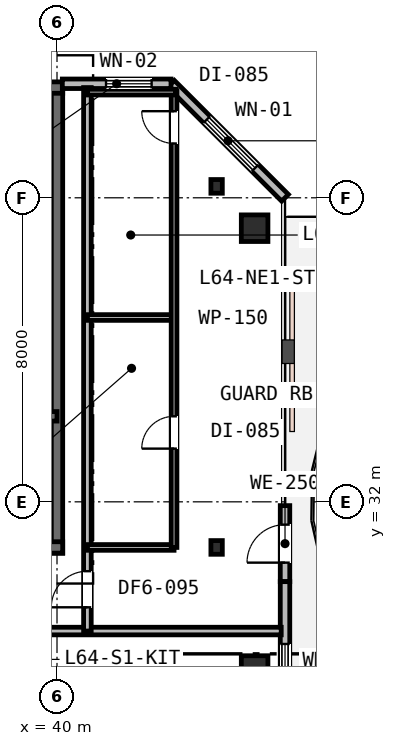
"""IFC4 building model, lengths in metres.
Left out: names, types, materials, properties, quantities, classifications, styles, units other than length and angle.
Written with IfcOpenShell. Run it as: python <this file> out.ifc"""

import sys

from ifc_helpers import new_model, si_unit, direction, frame, frame_2d, origin, origin_2d, place, context, subcontext, project, spatial, rectangle, i_section, extrude, element, fill, save


model = new_model("IFC4")
c1 = context("Model", 3, precision=1e-05, world=origin(), true_north=direction((0.0, 1.0)))
c2 = subcontext(c1, "Body", "Model", "MODEL_VIEW")
j1 = project(units=[si_unit("LENGTHUNIT", "METRE"), si_unit("PLANEANGLEUNIT", "RADIAN")], contexts=[c1])
p1 = place(None, origin())
s1 = spatial("IfcSite", under=j1, at=p1, CompositionType="ELEMENT")
p2 = place(p1, origin())
s2 = spatial("IfcBuilding", under=s1, at=p2, CompositionType="ELEMENT")
p3 = place(p2, frame((0.0, 0.0, 248.8)))
s3 = spatial("IfcBuildingStorey", under=s2, at=p3, CompositionType="ELEMENT", Elevation=248.8)
p4 = place(p3, frame((40.0, 30.65, 0.0), z_axis=(0.0, 0.0, 1.0), x_axis=(0.0, 1.0, 0.0)))
e1 = element("IfcWall", 1, at=p4, inside=s3, PredefinedType="SHEAR", context=c2, shape_type="SweptSolid", body=[
    extrude(rectangle(XDim=12.3, YDim=0.3, at=frame_2d((6.15, 0.0))), origin(), (0.0, 0.0, 1.0), 3.8),
])
p5 = place(p3, frame((15.85, 42.9, 0.0), z_axis=(0.0, 0.0, 1.0), x_axis=(1.0, 0.0, 0.0)))
e2 = element("IfcWall", 2, at=p5, inside=s3, PredefinedType="SHEAR", context=c2, shape_type="SweptSolid", body=[
    extrude(rectangle(XDim=24.3, YDim=0.3, at=frame_2d((12.15, 0.0))), origin(), (0.0, 0.0, 1.0), 3.8),
])
p6 = place(p3, frame((28.95, 30.8, 0.0), z_axis=(0.0, 0.0, 1.0), x_axis=(1.0, 0.0, 0.0)))
e3 = element("IfcWall", 3, at=p6, inside=s3, PredefinedType="SHEAR", context=c2, shape_type="SweptSolid", body=[
    extrude(rectangle(XDim=11.2, YDim=0.3, at=frame_2d((5.6, 0.0))), origin(), (0.0, 0.0, 1.0), 3.8),
])
p7 = place(p6, frame((7.65, 0.0, 0.0)))
e4 = element("IfcOpeningElement", 4, at=p7, cuts=e3, PredefinedType="OPENING", context=c2, shape_type="SweptSolid", body=[
    extrude(rectangle(XDim=1.1, YDim=2.15, at=frame_2d((0.55, 1.075))), frame((0.0, 0.16, 0.0), z_axis=(0.0, -1.0, 0.0), x_axis=(1.0, 0.0, 0.0)), (0.0, 0.0, 1.0), 0.32),
])
p8 = place(p3, frame((33.95, 34.25, 0.0), z_axis=(0.0, 0.0, 1.0), x_axis=(1.0, 0.0, 0.0)))
e5 = element("IfcWall", 5, at=p8, inside=s3, PredefinedType="SHEAR", context=c2, shape_type="SweptSolid", body=[
    extrude(rectangle(XDim=6.05, YDim=0.25, at=frame_2d((3.025, 0.0))), origin(), (0.0, 0.0, 1.0), 3.8),
])
p9 = place(p8, frame((3.7, 0.0, 0.0)))
e6 = element("IfcOpeningElement", 6, at=p9, cuts=e5, PredefinedType="OPENING", context=c2, shape_type="SweptSolid", body=[
    extrude(rectangle(XDim=1.0, YDim=2.15, at=frame_2d((0.5, 1.075))), frame((0.0, 0.135, 0.0), z_axis=(0.0, -1.0, 0.0), x_axis=(1.0, 0.0, 0.0)), (0.0, 0.0, 1.0), 0.27),
])
p10 = place(p8, frame((0.55, 0.0, 0.0)))
e7 = element("IfcOpeningElement", 7, at=p10, cuts=e5, PredefinedType="OPENING", context=c2, shape_type="SweptSolid", body=[
    extrude(rectangle(XDim=1.1, YDim=2.15, at=frame_2d((0.55, 1.075))), frame((0.0, 0.135, 0.0), z_axis=(0.0, -1.0, 0.0), x_axis=(1.0, 0.0, 0.0)), (0.0, 0.0, 1.0), 0.27),
])
for number, where, z_axis, x_axis in (
    (8, (45.2, 27.6, 0.0), (0.0, 0.0, 1.0), (1.0, 0.0, 0.0)),
    (9, (45.2, 39.2, 0.0), (0.0, 0.0, 1.0), (1.0, 0.0, 0.0)),
):
    element("IfcColumn", number, at=place(p3, frame(where, z_axis=z_axis, x_axis=x_axis)), inside=s3, PredefinedType="COLUMN", context=c2, shape_type="SweptSolid", body=[
        extrude(rectangle(XDim=0.7, YDim=0.7, at=origin_2d()), origin(), (0.0, 0.0, 1.0), 3.8),
    ])
for number, where, z_axis, x_axis in (
    (10, (44.2, 30.8, 0.0), (0.0, 0.0, 1.0), (1.0, 0.0, 0.0)),
    (11, (44.2, 40.3, 0.0), (0.0, 0.0, 1.0), (1.0, 0.0, 0.0)),
):
    element("IfcColumn", number, at=place(p3, frame(where, z_axis=z_axis, x_axis=x_axis)), inside=s3, PredefinedType="COLUMN", context=c2, shape_type="SweptSolid", body=[
        extrude(i_section(OverallWidth=0.3, OverallDepth=0.36, WebThickness=0.013, FlangeThickness=0.022, FilletRadius=0.027, at=origin_2d()), origin(), (0.0, 0.0, 1.0), 3.8),
    ])
p11 = place(p3, frame((46.0, 29.9, 0.0), z_axis=(0.0, 0.0, 1.0), x_axis=(0.0, 1.0, 0.0)))
e12 = element("IfcWall", 12, at=p11, inside=s3, PredefinedType="STANDARD", context=c2, shape_type="SweptSolid", body=[
    extrude(rectangle(XDim=2.0, YDim=0.25, at=frame_2d((1.0, 0.0))), origin(), (0.0, 0.0, 1.0), 3.53),
])
p12 = place(p11, frame((0.5, 0.0, 0.0)))
e13 = element("IfcOpeningElement", 13, at=p12, cuts=e12, PredefinedType="OPENING", context=c2, shape_type="SweptSolid", body=[
    extrude(rectangle(XDim=1.0, YDim=2.15, at=frame_2d((0.5, 1.075))), frame((0.0, 0.135, 0.0), z_axis=(0.0, -1.0, 0.0), x_axis=(1.0, 0.0, 0.0)), (0.0, 0.0, 1.0), 0.27),
])
p13 = place(p3, frame((46.0, 27.0, 0.0), z_axis=(0.0, 0.0, 1.0), x_axis=(0.0, 1.0, 0.0)))
e14 = element("IfcWall", 14, at=p13, inside=s3, PredefinedType="STANDARD", context=c2, shape_type="SweptSolid", body=[
    extrude(rectangle(XDim=2.9, YDim=0.25, at=frame_2d((1.45, 0.0))), origin(), (0.0, 0.0, 1.0), 3.53),
])
p14 = place(p13, frame((0.36, 0.0, 0.9)))
e15 = element("IfcOpeningElement", 15, at=p14, cuts=e14, PredefinedType="OPENING", context=c2, shape_type="SweptSolid", body=[
    extrude(rectangle(XDim=0.9, YDim=1.55, at=frame_2d((0.45, 0.775))), frame((0.0, 0.135, 0.0), z_axis=(0.0, -1.0, 0.0), x_axis=(1.0, 0.0, 0.0)), (0.0, 0.0, 1.0), 0.27),
])
p15 = place(p3, frame((46.0, 40.0, 0.0), z_axis=(0.0, 0.0, 1.0), x_axis=(-0.707106781187, 0.707106781187, 0.0)))
e16 = element("IfcWall", 16, at=p15, inside=s3, PredefinedType="STANDARD", context=c2, shape_type="SweptSolid", body=[
    extrude(rectangle(XDim=4.243, YDim=0.25, at=frame_2d((2.121, 0.0))), origin(), (0.0, 0.0, 1.0), 3.53),
])
p16 = place(p15, frame((1.111, 0.0, 0.75)))
e17 = element("IfcOpeningElement", 17, at=p16, cuts=e16, PredefinedType="OPENING", context=c2, shape_type="SweptSolid", body=[
    extrude(rectangle(XDim=1.8, YDim=1.85, at=frame_2d((0.9, 0.925))), frame((0.0, 0.135, 0.0), z_axis=(0.0, -1.0, 0.0), x_axis=(1.0, 0.0, 0.0)), (0.0, 0.0, 1.0), 0.27),
])
p17 = place(p3, frame((43.0, 43.0, 0.0), z_axis=(0.0, 0.0, 1.0), x_axis=(-1.0, 0.0, 0.0)))
e18 = element("IfcWall", 18, at=p17, inside=s3, PredefinedType="STANDARD", context=c2, shape_type="SweptSolid", body=[
    extrude(rectangle(XDim=2.86, YDim=0.25, at=frame_2d((1.43, 0.0))), origin(), (0.0, 0.0, 1.0), 3.53),
])
p18 = place(p17, frame((0.51, 0.0, 0.85)))
e19 = element("IfcOpeningElement", 19, at=p18, cuts=e18, PredefinedType="OPENING", context=c2, shape_type="SweptSolid", body=[
    extrude(rectangle(XDim=1.2, YDim=1.6, at=frame_2d((0.6, 0.8))), frame((0.0, 0.135, 0.0), z_axis=(0.0, -1.0, 0.0), x_axis=(1.0, 0.0, 0.0)), (0.0, 0.0, 1.0), 0.27),
])
p19 = place(p3, frame((11.6, 28.6, 0.0), z_axis=(0.0, 0.0, 1.0), x_axis=(1.0, 0.0, 0.0)))
e20 = element("IfcWall", 20, at=p19, inside=s3, PredefinedType="PARTITIONING", context=c2, shape_type="SweptSolid", body=[
    extrude(rectangle(XDim=34.3, YDim=0.2, at=frame_2d((17.15, 0.0))), origin(), (0.0, 0.0, 1.0), 3.16),
])
p20 = place(p19, frame((14.625, 0.0, 0.0)))
e21 = element("IfcOpeningElement", 21, at=p20, cuts=e20, PredefinedType="OPENING", context=c2, shape_type="SweptSolid", body=[
    extrude(rectangle(XDim=0.95, YDim=2.15, at=frame_2d((0.475, 1.075))), frame((0.0, 0.11, 0.0), z_axis=(0.0, -1.0, 0.0), x_axis=(1.0, 0.0, 0.0)), (0.0, 0.0, 1.0), 0.22),
])
p21 = place(p19, frame((26.225, 0.0, 0.0)))
e22 = element("IfcOpeningElement", 22, at=p21, cuts=e20, PredefinedType="OPENING", context=c2, shape_type="SweptSolid", body=[
    extrude(rectangle(XDim=0.95, YDim=2.15, at=frame_2d((0.475, 1.075))), frame((0.0, 0.11, 0.0), z_axis=(0.0, -1.0, 0.0), x_axis=(1.0, 0.0, 0.0)), (0.0, 0.0, 1.0), 0.22),
])
p22 = place(p3, frame((40.8, 28.6, 0.0), z_axis=(0.0, 0.0, 1.0), x_axis=(0.0, 1.0, 0.0)))
e23 = element("IfcWall", 23, at=p22, inside=s3, PredefinedType="PARTITIONING", context=c2, shape_type="SweptSolid", body=[
    extrude(rectangle(XDim=14.3, YDim=0.2, at=frame_2d((7.15, 0.0))), origin(), (0.0, 0.0, 1.0), 3.16),
])
p23 = place(p22, frame((0.625, 0.0, 0.0)))
e24 = element("IfcOpeningElement", 24, at=p23, cuts=e23, PredefinedType="OPENING", context=c2, shape_type="SweptSolid", body=[
    extrude(rectangle(XDim=0.95, YDim=2.15, at=frame_2d((0.475, 1.075))), frame((0.0, 0.11, 0.0), z_axis=(0.0, -1.0, 0.0), x_axis=(1.0, 0.0, 0.0)), (0.0, 0.0, 1.0), 0.22),
])
p24 = place(p3, frame((40.8, 30.8, 0.0), z_axis=(0.0, 0.0, 1.0), x_axis=(1.0, 0.0, 0.0)))
e25 = element("IfcWall", 25, at=p24, inside=s3, PredefinedType="PARTITIONING", context=c2, shape_type="SweptSolid", body=[
    extrude(rectangle(XDim=2.28, YDim=0.15, at=frame_2d((1.14, 0.0))), origin(), (0.0, 0.0, 1.0), 3.16),
])
p25 = place(p3, frame((40.8, 36.85, 0.0), z_axis=(0.0, 0.0, 1.0), x_axis=(1.0, 0.0, 0.0)))
e26 = element("IfcWall", 26, at=p25, inside=s3, PredefinedType="PARTITIONING", context=c2, shape_type="SweptSolid", body=[
    extrude(rectangle(XDim=2.28, YDim=0.15, at=frame_2d((1.14, 0.0))), origin(), (0.0, 0.0, 1.0), 3.53),
])
p26 = place(p3, frame((43.08, 30.8, 0.0), z_axis=(0.0, 0.0, 1.0), x_axis=(0.0, 1.0, 0.0)))
e27 = element("IfcWall", 27, at=p26, inside=s3, PredefinedType="PARTITIONING", context=c2, shape_type="SweptSolid", body=[
    extrude(rectangle(XDim=12.02, YDim=0.15, at=frame_2d((6.01, 0.0))), origin(), (0.0, 0.0, 1.0), 3.16),
])
p27 = place(p26, frame((2.6, 0.0, 0.0)))
e28 = element("IfcOpeningElement", 28, at=p27, cuts=e27, PredefinedType="OPENING", context=c2, shape_type="SweptSolid", body=[
    extrude(rectangle(XDim=0.85, YDim=2.15, at=frame_2d((0.425, 1.075))), frame((0.0, 0.085, 0.0), z_axis=(0.0, -1.0, 0.0), x_axis=(1.0, 0.0, 0.0)), (0.0, 0.0, 1.0), 0.17),
])
p28 = place(p26, frame((10.629, 0.0, 0.0)))
e29 = element("IfcOpeningElement", 29, at=p28, cuts=e27, PredefinedType="OPENING", context=c2, shape_type="SweptSolid", body=[
    extrude(rectangle(XDim=0.85, YDim=2.15, at=frame_2d((0.425, 1.075))), frame((0.0, 0.085, 0.0), z_axis=(0.0, -1.0, 0.0), x_axis=(1.0, 0.0, 0.0)), (0.0, 0.0, 1.0), 0.17),
])
p29 = place(p3, frame((40.8, 42.78, 0.0), z_axis=(0.0, 0.0, 1.0), x_axis=(1.0, 0.0, 0.0)))
e30 = element("IfcWall", 30, at=p29, inside=s3, PredefinedType="PARTITIONING", context=c2, shape_type="SweptSolid", body=[
    extrude(rectangle(XDim=2.32, YDim=0.15, at=frame_2d((1.16, 0.0))), origin(), (0.0, 0.0, 1.0), 3.53),
])
p30 = place(p12, origin())
e31 = element("IfcDoor", 31, at=p30, inside=s3, OperationType="SINGLE_SWING_LEFT", PredefinedType="DOOR", context=c2, shape_type="SweptSolid", body=[
    extrude(rectangle(XDim=1.0, YDim=2.15, at=frame_2d((0.5, 1.075))), frame((0.0, 0.025, 0.0), z_axis=(0.0, -1.0, 0.0), x_axis=(1.0, 0.0, 0.0)), (0.0, 0.0, 1.0), 0.05),
])
fill(e13, e31)
p31 = place(p14, origin())
e32 = element("IfcWindow", 32, at=p31, inside=s3, PartitioningType="SINGLE_PANEL", PredefinedType="WINDOW", context=c2, shape_type="SweptSolid", body=[
    extrude(rectangle(XDim=0.9, YDim=1.55, at=frame_2d((0.45, 0.775))), frame((0.0, 0.03, 0.0), z_axis=(0.0, -1.0, 0.0), x_axis=(1.0, 0.0, 0.0)), (0.0, 0.0, 1.0), 0.06),
])
fill(e15, e32)
p32 = place(p16, origin())
e33 = element("IfcWindow", 33, at=p32, inside=s3, PartitioningType="SINGLE_PANEL", PredefinedType="WINDOW", context=c2, shape_type="SweptSolid", body=[
    extrude(rectangle(XDim=1.8, YDim=1.85, at=frame_2d((0.9, 0.925))), frame((0.0, 0.03, 0.0), z_axis=(0.0, -1.0, 0.0), x_axis=(1.0, 0.0, 0.0)), (0.0, 0.0, 1.0), 0.06),
])
fill(e17, e33)
p33 = place(p18, origin())
e34 = element("IfcWindow", 34, at=p33, inside=s3, PartitioningType="SINGLE_PANEL", PredefinedType="WINDOW", context=c2, shape_type="SweptSolid", body=[
    extrude(rectangle(XDim=1.2, YDim=1.6, at=frame_2d((0.6, 0.8))), frame((0.0, 0.03, 0.0), z_axis=(0.0, -1.0, 0.0), x_axis=(1.0, 0.0, 0.0)), (0.0, 0.0, 1.0), 0.06),
])
fill(e19, e34)
p34 = place(p23, origin())
e35 = element("IfcDoor", 35, at=p34, inside=s3, OperationType="SINGLE_SWING_LEFT", PredefinedType="DOOR", context=c2, shape_type="SweptSolid", body=[
    extrude(rectangle(XDim=0.95, YDim=2.15, at=frame_2d((0.475, 1.075))), frame((0.0, 0.025, 0.0), z_axis=(0.0, -1.0, 0.0), x_axis=(1.0, 0.0, 0.0)), (0.0, 0.0, 1.0), 0.05),
])
fill(e24, e35)
p35 = place(p27, origin())
e36 = element("IfcDoor", 36, at=p35, inside=s3, OperationType="SINGLE_SWING_LEFT", PredefinedType="DOOR", context=c2, shape_type="SweptSolid", body=[
    extrude(rectangle(XDim=0.85, YDim=2.15, at=frame_2d((0.425, 1.075))), frame((0.0, 0.025, 0.0), z_axis=(0.0, -1.0, 0.0), x_axis=(1.0, 0.0, 0.0)), (0.0, 0.0, 1.0), 0.05),
])
fill(e28, e36)
p36 = place(p28, origin())
e37 = element("IfcDoor", 37, at=p36, inside=s3, OperationType="SINGLE_SWING_RIGHT", PredefinedType="DOOR", context=c2, shape_type="SweptSolid", body=[
    extrude(rectangle(XDim=0.85, YDim=2.15, at=frame_2d((0.425, 1.075))), frame((0.0, 0.025, 0.0), z_axis=(0.0, -1.0, 0.0), x_axis=(1.0, 0.0, 0.0)), (0.0, 0.0, 1.0), 0.05),
])
fill(e29, e37)
save(model, sys.argv[1])
